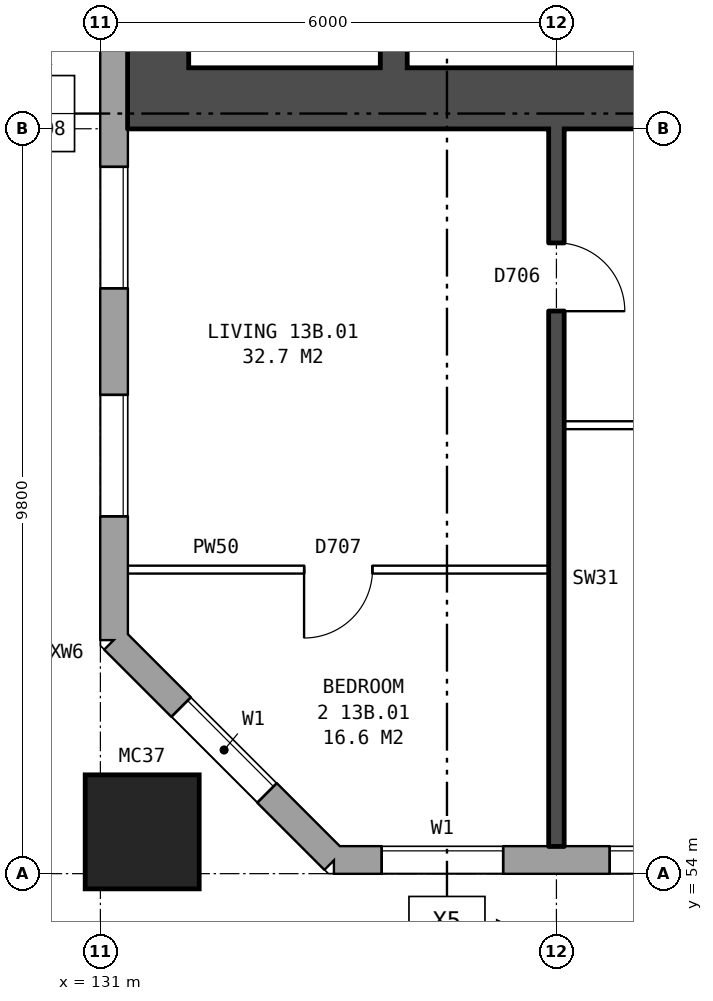
"""IFC4 building model, lengths in metres.
Left out: names, types, materials, properties, quantities, classifications, styles, units other than length and angle.
Written with IfcOpenShell. Run it as: python <this file> out.ifc"""

import sys

from ifc_helpers import new_model, si_unit, direction, frame, frame_2d, origin, origin_2d, place, context, subcontext, project, spatial, rectangle, hollow_rectangle, extrude, element, fill, save


model = new_model("IFC4")
c1 = context("Model", 3, precision=1e-05, world=origin(), true_north=direction((0.0, 1.0)))
c2 = subcontext(c1, "Body", "Model", "MODEL_VIEW")
j1 = project(units=[si_unit("LENGTHUNIT", "METRE"), si_unit("PLANEANGLEUNIT", "RADIAN")], contexts=[c1])
p1 = place(None, origin())
s1 = spatial("IfcSite", under=j1, at=p1, CompositionType="ELEMENT")
p2 = place(p1, origin())
s2 = spatial("IfcBuilding", under=s1, at=p2, CompositionType="ELEMENT")
p3 = place(p2, frame((0.0, 0.0, 50.5)))
s3 = spatial("IfcBuildingStorey", under=s2, at=p3, CompositionType="ELEMENT", Elevation=50.5)
p4 = place(p3, frame((131.55, 54.55, 0.0), z_axis=(0.0, 0.0, 1.0), x_axis=(1.0, 0.0, 0.0)))
e1 = element("IfcColumn", 1, at=p4, inside=s3, PredefinedType="COLUMN", context=c2, shape_type="SweptSolid", body=[
    extrude(hollow_rectangle(XDim=1.5, YDim=1.5, WallThickness=0.08, at=origin_2d()), origin(), (0.0, 0.0, 1.0), 3.1),
])
p5 = place(p3, frame((131.18, 57.075, 0.0), z_axis=(0.0, 0.0, 1.0), x_axis=(0.707106781187, -0.707106781187, 0.0)))
e2 = element("IfcWall", 2, at=p5, inside=s3, PredefinedType="STANDARD", context=c2, shape_type="SweptSolid", body=[
    extrude(rectangle(XDim=4.094, YDim=0.36, at=frame_2d((2.047, 0.0))), origin(), (0.0, 0.0, 1.0), 2.85),
])
p6 = place(p5, frame((1.247, 0.0, 0.8)))
e3 = element("IfcOpeningElement", 3, at=p6, cuts=e2, PredefinedType="OPENING", context=c2, shape_type="SweptSolid", body=[
    extrude(rectangle(XDim=1.6, YDim=1.8, at=frame_2d((0.8, 0.9))), frame((0.0, 0.19, 0.0), z_axis=(0.0, -1.0, 0.0), x_axis=(1.0, 0.0, 0.0)), (0.0, 0.0, 1.0), 0.38),
])
p7 = place(p3, frame((134.075, 54.18, 0.0), z_axis=(0.0, 0.0, 1.0), x_axis=(1.0, 0.0, 0.0)))
e4 = element("IfcWall", 4, at=p7, inside=s3, PredefinedType="STANDARD", context=c2, shape_type="SweptSolid", body=[
    extrude(rectangle(XDim=39.351, YDim=0.36, at=frame_2d((19.675, 0.0))), origin(), (0.0, 0.0, 1.0), 2.85),
])
p8 = place(p7, frame((0.625, 0.0, 0.8)))
e5 = element("IfcOpeningElement", 5, at=p8, cuts=e4, PredefinedType="OPENING", context=c2, shape_type="SweptSolid", body=[
    extrude(rectangle(XDim=1.6, YDim=1.8, at=frame_2d((0.8, 0.9))), frame((0.0, 0.19, 0.0), z_axis=(0.0, -1.0, 0.0), x_axis=(1.0, 0.0, 0.0)), (0.0, 0.0, 1.0), 0.38),
])
p9 = place(p7, frame((3.625, 0.0, 0.8)))
e6 = element("IfcOpeningElement", 6, at=p9, cuts=e4, PredefinedType="OPENING", context=c2, shape_type="SweptSolid", body=[
    extrude(rectangle(XDim=1.6, YDim=1.8, at=frame_2d((0.8, 0.9))), frame((0.0, 0.19, 0.0), z_axis=(0.0, -1.0, 0.0), x_axis=(1.0, 0.0, 0.0)), (0.0, 0.0, 1.0), 0.38),
])
p10 = place(p7, frame((5.525, 0.0, 1.4)))
e7 = element("IfcOpeningElement", 7, at=p10, cuts=e4, PredefinedType="OPENING", context=c2, shape_type="SweptSolid", body=[
    extrude(rectangle(XDim=0.6, YDim=1.2, at=frame_2d((0.3, 0.6))), frame((0.0, 0.19, 0.0), z_axis=(0.0, -1.0, 0.0), x_axis=(1.0, 0.0, 0.0)), (0.0, 0.0, 1.0), 0.38),
])
p11 = place(p7, frame((9.625, 0.0, 0.8)))
e8 = element("IfcOpeningElement", 8, at=p11, cuts=e4, PredefinedType="OPENING", context=c2, shape_type="SweptSolid", body=[
    extrude(rectangle(XDim=1.6, YDim=1.8, at=frame_2d((0.8, 0.9))), frame((0.0, 0.19, 0.0), z_axis=(0.0, -1.0, 0.0), x_axis=(1.0, 0.0, 0.0)), (0.0, 0.0, 1.0), 0.38),
])
p12 = place(p7, frame((12.625, 0.0, 0.8)))
e9 = element("IfcOpeningElement", 9, at=p12, cuts=e4, PredefinedType="OPENING", context=c2, shape_type="SweptSolid", body=[
    extrude(rectangle(XDim=1.6, YDim=1.8, at=frame_2d((0.8, 0.9))), frame((0.0, 0.19, 0.0), z_axis=(0.0, -1.0, 0.0), x_axis=(1.0, 0.0, 0.0)), (0.0, 0.0, 1.0), 0.38),
])
p13 = place(p7, frame((15.625, 0.0, 0.8)))
e10 = element("IfcOpeningElement", 10, at=p13, cuts=e4, PredefinedType="OPENING", context=c2, shape_type="SweptSolid", body=[
    extrude(rectangle(XDim=1.6, YDim=1.8, at=frame_2d((0.8, 0.9))), frame((0.0, 0.19, 0.0), z_axis=(0.0, -1.0, 0.0), x_axis=(1.0, 0.0, 0.0)), (0.0, 0.0, 1.0), 0.38),
])
p14 = place(p7, frame((18.625, 0.0, 0.8)))
e11 = element("IfcOpeningElement", 11, at=p14, cuts=e4, PredefinedType="OPENING", context=c2, shape_type="SweptSolid", body=[
    extrude(rectangle(XDim=1.6, YDim=1.8, at=frame_2d((0.8, 0.9))), frame((0.0, 0.19, 0.0), z_axis=(0.0, -1.0, 0.0), x_axis=(1.0, 0.0, 0.0)), (0.0, 0.0, 1.0), 0.38),
])
p15 = place(p7, frame((21.625, 0.0, 0.8)))
e12 = element("IfcOpeningElement", 12, at=p15, cuts=e4, PredefinedType="OPENING", context=c2, shape_type="SweptSolid", body=[
    extrude(rectangle(XDim=1.6, YDim=1.8, at=frame_2d((0.8, 0.9))), frame((0.0, 0.19, 0.0), z_axis=(0.0, -1.0, 0.0), x_axis=(1.0, 0.0, 0.0)), (0.0, 0.0, 1.0), 0.38),
])
p16 = place(p7, frame((24.625, 0.0, 0.8)))
e13 = element("IfcOpeningElement", 13, at=p16, cuts=e4, PredefinedType="OPENING", context=c2, shape_type="SweptSolid", body=[
    extrude(rectangle(XDim=1.6, YDim=1.8, at=frame_2d((0.8, 0.9))), frame((0.0, 0.19, 0.0), z_axis=(0.0, -1.0, 0.0), x_axis=(1.0, 0.0, 0.0)), (0.0, 0.0, 1.0), 0.38),
])
p17 = place(p7, frame((27.625, 0.0, 0.8)))
e14 = element("IfcOpeningElement", 14, at=p17, cuts=e4, PredefinedType="OPENING", context=c2, shape_type="SweptSolid", body=[
    extrude(rectangle(XDim=1.6, YDim=1.8, at=frame_2d((0.8, 0.9))), frame((0.0, 0.19, 0.0), z_axis=(0.0, -1.0, 0.0), x_axis=(1.0, 0.0, 0.0)), (0.0, 0.0, 1.0), 0.38),
])
p18 = place(p7, frame((30.125, 0.0, 0.8)))
e15 = element("IfcOpeningElement", 15, at=p18, cuts=e4, PredefinedType="OPENING", context=c2, shape_type="SweptSolid", body=[
    extrude(rectangle(XDim=0.6, YDim=1.5, at=frame_2d((0.3, 0.75))), frame((0.0, 0.19, 0.0), z_axis=(0.0, -1.0, 0.0), x_axis=(1.0, 0.0, 0.0)), (0.0, 0.0, 1.0), 0.38),
])
p19 = place(p7, frame((33.625, 0.0, 0.8)))
e16 = element("IfcOpeningElement", 16, at=p19, cuts=e4, PredefinedType="OPENING", context=c2, shape_type="SweptSolid", body=[
    extrude(rectangle(XDim=1.6, YDim=1.8, at=frame_2d((0.8, 0.9))), frame((0.0, 0.19, 0.0), z_axis=(0.0, -1.0, 0.0), x_axis=(1.0, 0.0, 0.0)), (0.0, 0.0, 1.0), 0.38),
])
p20 = place(p7, frame((36.625, 0.0, 0.8)))
e17 = element("IfcOpeningElement", 17, at=p20, cuts=e4, PredefinedType="OPENING", context=c2, shape_type="SweptSolid", body=[
    extrude(rectangle(XDim=1.6, YDim=1.8, at=frame_2d((0.8, 0.9))), frame((0.0, 0.19, 0.0), z_axis=(0.0, -1.0, 0.0), x_axis=(1.0, 0.0, 0.0)), (0.0, 0.0, 1.0), 0.38),
])
p21 = place(p7, frame((7.725, 0.0, 0.8)))
e18 = element("IfcOpeningElement", 18, at=p21, cuts=e4, PredefinedType="OPENING", context=c2, shape_type="SweptSolid", body=[
    extrude(rectangle(XDim=1.0, YDim=0.9, at=frame_2d((0.5, 0.45))), frame((0.0, 0.19, 0.0), z_axis=(0.0, -1.0, 0.0), x_axis=(1.0, 0.0, 0.0)), (0.0, 0.0, 1.0), 0.38),
])
p22 = place(p7, frame((31.025, 0.0, 0.8)))
e19 = element("IfcOpeningElement", 19, at=p22, cuts=e4, PredefinedType="OPENING", context=c2, shape_type="SweptSolid", body=[
    extrude(rectangle(XDim=0.6, YDim=0.9, at=frame_2d((0.3, 0.45))), frame((0.0, 0.19, 0.0), z_axis=(0.0, -1.0, 0.0), x_axis=(1.0, 0.0, 0.0)), (0.0, 0.0, 1.0), 0.38),
])
p23 = place(p3, frame((131.18, 82.925, 0.0), z_axis=(0.0, 0.0, 1.0), x_axis=(0.0, -1.0, 0.0)))
e20 = element("IfcWall", 20, at=p23, inside=s3, PredefinedType="STANDARD", context=c2, shape_type="SweptSolid", body=[
    extrude(rectangle(XDim=25.851, YDim=0.36, at=frame_2d((12.925, 0.0))), origin(), (0.0, 0.0, 1.0), 2.85),
])
p24 = place(p23, frame((1.625, 0.0, 0.8)))
e21 = element("IfcOpeningElement", 21, at=p24, cuts=e20, PredefinedType="OPENING", context=c2, shape_type="SweptSolid", body=[
    extrude(rectangle(XDim=1.6, YDim=1.8, at=frame_2d((0.8, 0.9))), frame((0.0, 0.19, 0.0), z_axis=(0.0, -1.0, 0.0), x_axis=(1.0, 0.0, 0.0)), (0.0, 0.0, 1.0), 0.38),
])
p25 = place(p23, frame((4.625, 0.0, 0.8)))
e22 = element("IfcOpeningElement", 22, at=p25, cuts=e20, PredefinedType="OPENING", context=c2, shape_type="SweptSolid", body=[
    extrude(rectangle(XDim=1.6, YDim=1.8, at=frame_2d((0.8, 0.9))), frame((0.0, 0.19, 0.0), z_axis=(0.0, -1.0, 0.0), x_axis=(1.0, 0.0, 0.0)), (0.0, 0.0, 1.0), 0.38),
])
p26 = place(p23, frame((19.625, 0.0, 0.8)))
e23 = element("IfcOpeningElement", 23, at=p26, cuts=e20, PredefinedType="OPENING", context=c2, shape_type="SweptSolid", body=[
    extrude(rectangle(XDim=1.6, YDim=1.8, at=frame_2d((0.8, 0.9))), frame((0.0, 0.19, 0.0), z_axis=(0.0, -1.0, 0.0), x_axis=(1.0, 0.0, 0.0)), (0.0, 0.0, 1.0), 0.38),
])
p27 = place(p23, frame((22.625, 0.0, 0.8)))
e24 = element("IfcOpeningElement", 24, at=p27, cuts=e20, PredefinedType="OPENING", context=c2, shape_type="SweptSolid", body=[
    extrude(rectangle(XDim=1.6, YDim=1.8, at=frame_2d((0.8, 0.9))), frame((0.0, 0.19, 0.0), z_axis=(0.0, -1.0, 0.0), x_axis=(1.0, 0.0, 0.0)), (0.0, 0.0, 1.0), 0.38),
])
p28 = place(p3, frame((131.76, 64.6, 0.0), z_axis=(0.0, 0.0, 1.0), x_axis=(0.0, 1.0, 0.0)))
e25 = element("IfcWall", 25, at=p28, inside=s3, PredefinedType="SHEAR", context=c2, shape_type="SweptSolid", body=[
    extrude(rectangle(XDim=10.8, YDim=0.8, at=frame_2d((5.4, 0.0))), origin(), (0.0, 0.0, 1.0), 2.85),
])
p29 = place(p3, frame((139.76, 64.2, 0.0), z_axis=(0.0, 0.0, 1.0), x_axis=(-1.0, 0.0, 0.0)))
e26 = element("IfcWall", 26, at=p29, inside=s3, PredefinedType="SHEAR", context=c2, shape_type="SweptSolid", body=[
    extrude(rectangle(XDim=8.4, YDim=0.8, at=frame_2d((4.2, 0.0))), origin(), (0.0, 0.0, 1.0), 2.85),
])
p30 = place(p3, frame((134.86, 64.6, 0.0), z_axis=(0.0, 0.0, 1.0), x_axis=(0.0, 1.0, 0.0)))
e27 = element("IfcWall", 27, at=p30, inside=s3, PredefinedType="SHEAR", context=c2, shape_type="SweptSolid", body=[
    extrude(rectangle(XDim=6.475, YDim=0.35, at=frame_2d((3.237, 0.0))), origin(), (0.0, 0.0, 1.0), 2.85),
])
p31 = place(p3, frame((131.36, 58.0, 0.0), z_axis=(0.0, 0.0, 1.0), x_axis=(1.0, 0.0, 0.0)))
e28 = element("IfcWall", 28, at=p31, inside=s3, PredefinedType="PARTITIONING", context=c2, shape_type="SweptSolid", body=[
    extrude(rectangle(XDim=5.54, YDim=0.1, at=frame_2d((2.77, 0.0))), origin(), (0.0, 0.0, 1.0), 2.85),
])
p32 = place(p31, frame((2.32, 0.0, 0.0)))
e29 = element("IfcOpeningElement", 29, at=p32, cuts=e28, PredefinedType="OPENING", context=c2, shape_type="SweptSolid", body=[
    extrude(rectangle(XDim=0.9, YDim=2.1, at=frame_2d((0.45, 1.05))), frame((0.0, 0.06, 0.0), z_axis=(0.0, -1.0, 0.0), x_axis=(1.0, 0.0, 0.0)), (0.0, 0.0, 1.0), 0.12),
])
p33 = place(p3, frame((137.1, 59.9, 0.0), z_axis=(0.0, 0.0, 1.0), x_axis=(1.0, 0.0, 0.0)))
e30 = element("IfcWall", 30, at=p33, inside=s3, PredefinedType="PARTITIONING", context=c2, shape_type="SweptSolid", body=[
    extrude(rectangle(XDim=5.8, YDim=0.1, at=frame_2d((2.9, 0.0))), origin(), (0.0, 0.0, 1.0), 2.85),
])
p34 = place(p33, frame((1.3, 0.0, 0.0)))
e31 = element("IfcOpeningElement", 31, at=p34, cuts=e30, PredefinedType="OPENING", context=c2, shape_type="SweptSolid", body=[
    extrude(rectangle(XDim=0.9, YDim=2.1, at=frame_2d((0.45, 1.05))), frame((0.0, 0.06, 0.0), z_axis=(0.0, -1.0, 0.0), x_axis=(1.0, 0.0, 0.0)), (0.0, 0.0, 1.0), 0.12),
])
p35 = place(p33, frame((4.2, 0.0, 0.0)))
e32 = element("IfcOpeningElement", 32, at=p35, cuts=e30, PredefinedType="OPENING", context=c2, shape_type="SweptSolid", body=[
    extrude(rectangle(XDim=0.9, YDim=2.1, at=frame_2d((0.45, 1.05))), frame((0.0, 0.06, 0.0), z_axis=(0.0, -1.0, 0.0), x_axis=(1.0, 0.0, 0.0)), (0.0, 0.0, 1.0), 0.12),
])
p36 = place(p3, frame((137.0, 54.36, 0.0), z_axis=(0.0, 0.0, 1.0), x_axis=(0.0, 1.0, 0.0)))
e33 = element("IfcWall", 33, at=p36, inside=s3, PredefinedType="SOLIDWALL", context=c2, shape_type="SweptSolid", body=[
    extrude(rectangle(XDim=9.44, YDim=0.2, at=frame_2d((4.72, 0.0))), origin(), (0.0, 0.0, 1.0), 2.85),
])
p37 = place(p36, frame((7.04, 0.0, 0.0)))
e34 = element("IfcOpeningElement", 34, at=p37, cuts=e33, PredefinedType="OPENING", context=c2, shape_type="SweptSolid", body=[
    extrude(rectangle(XDim=0.9, YDim=2.1, at=frame_2d((0.45, 1.05))), frame((0.0, 0.11, 0.0), z_axis=(0.0, -1.0, 0.0), x_axis=(1.0, 0.0, 0.0)), (0.0, 0.0, 1.0), 0.22),
])
p38 = place(p6, origin())
e35 = element("IfcWindow", 35, at=p38, inside=s3, PartitioningType="SINGLE_PANEL", PredefinedType="WINDOW", context=c2, shape_type="SweptSolid", body=[
    extrude(rectangle(XDim=1.6, YDim=1.8, at=frame_2d((0.8, 0.9))), frame((0.0, 0.15, 0.0), z_axis=(0.0, -1.0, 0.0), x_axis=(1.0, 0.0, 0.0)), (0.0, 0.0, 1.0), 0.06),
])
fill(e3, e35)
p39 = place(p8, origin())
e36 = element("IfcWindow", 36, at=p39, inside=s3, PartitioningType="SINGLE_PANEL", PredefinedType="WINDOW", context=c2, shape_type="SweptSolid", body=[
    extrude(rectangle(XDim=1.6, YDim=1.8, at=frame_2d((0.8, 0.9))), frame((0.0, 0.15, 0.0), z_axis=(0.0, -1.0, 0.0), x_axis=(1.0, 0.0, 0.0)), (0.0, 0.0, 1.0), 0.06),
])
fill(e5, e36)
p40 = place(p9, origin())
e37 = element("IfcWindow", 37, at=p40, inside=s3, PartitioningType="SINGLE_PANEL", PredefinedType="WINDOW", context=c2, shape_type="SweptSolid", body=[
    extrude(rectangle(XDim=1.6, YDim=1.8, at=frame_2d((0.8, 0.9))), frame((0.0, 0.15, 0.0), z_axis=(0.0, -1.0, 0.0), x_axis=(1.0, 0.0, 0.0)), (0.0, 0.0, 1.0), 0.06),
])
fill(e6, e37)
p41 = place(p26, origin())
e38 = element("IfcWindow", 38, at=p41, inside=s3, PartitioningType="SINGLE_PANEL", PredefinedType="WINDOW", context=c2, shape_type="SweptSolid", body=[
    extrude(rectangle(XDim=1.6, YDim=1.8, at=frame_2d((0.8, 0.9))), frame((0.0, 0.15, 0.0), z_axis=(0.0, -1.0, 0.0), x_axis=(1.0, 0.0, 0.0)), (0.0, 0.0, 1.0), 0.06),
])
fill(e23, e38)
p42 = place(p27, origin())
e39 = element("IfcWindow", 39, at=p42, inside=s3, PartitioningType="SINGLE_PANEL", PredefinedType="WINDOW", context=c2, shape_type="SweptSolid", body=[
    extrude(rectangle(XDim=1.6, YDim=1.8, at=frame_2d((0.8, 0.9))), frame((0.0, 0.15, 0.0), z_axis=(0.0, -1.0, 0.0), x_axis=(1.0, 0.0, 0.0)), (0.0, 0.0, 1.0), 0.06),
])
fill(e24, e39)
p43 = place(p32, frame((0.9, 0.0, 0.0), z_axis=(0.0, 0.0, 1.0), x_axis=(-1.0, 0.0, 0.0)))
e40 = element("IfcDoor", 40, at=p43, inside=s3, OperationType="SINGLE_SWING_RIGHT", PredefinedType="DOOR", context=c2, shape_type="SweptSolid", body=[
    extrude(rectangle(XDim=0.9, YDim=2.1, at=frame_2d((0.45, 1.05))), frame((0.0, 0.025, 0.0), z_axis=(0.0, -1.0, 0.0), x_axis=(1.0, 0.0, 0.0)), (0.0, 0.0, 1.0), 0.05),
])
fill(e29, e40)
p44 = place(p37, frame((0.9, 0.0, 0.0), z_axis=(0.0, 0.0, 1.0), x_axis=(-1.0, 0.0, 0.0)))
e41 = element("IfcDoor", 41, at=p44, inside=s3, OperationType="SINGLE_SWING_RIGHT", PredefinedType="DOOR", context=c2, shape_type="SweptSolid", body=[
    extrude(rectangle(XDim=0.9, YDim=2.1, at=frame_2d((0.45, 1.05))), frame((0.0, 0.025, 0.0), z_axis=(0.0, -1.0, 0.0), x_axis=(1.0, 0.0, 0.0)), (0.0, 0.0, 1.0), 0.05),
])
fill(e34, e41)
save(model, sys.argv[1])
